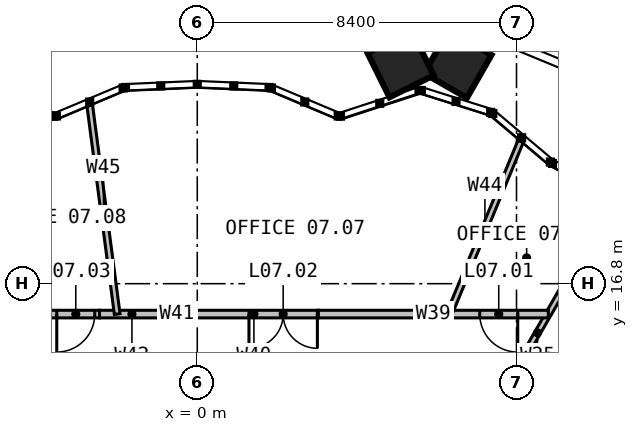
"""IFC4 building model, lengths in metres.
Left out: names, types, materials, properties, quantities, classifications, styles, units other than length and angle.
Written with IfcOpenShell. Run it as: python <this file> out.ifc"""

import sys

from ifc_helpers import new_model, si_unit, direction, frame, frame_2d, origin, place, context, subcontext, project, spatial, rectangle, extrude, element, fill, save


model = new_model("IFC4")
c1 = context("Model", 3, precision=1e-05, world=origin(), true_north=direction((0.0, 1.0)))
c2 = subcontext(c1, "Body", "Model", "MODEL_VIEW")
j1 = project(units=[si_unit("LENGTHUNIT", "METRE"), si_unit("PLANEANGLEUNIT", "RADIAN")], contexts=[c1])
p1 = place(None, origin())
s1 = spatial("IfcSite", under=j1, at=p1, CompositionType="ELEMENT")
p2 = place(p1, origin())
s2 = spatial("IfcBuilding", under=s1, at=p2, CompositionType="ELEMENT")
p3 = place(p2, frame((0.0, 0.0, 33.0)))
s3 = spatial("IfcBuildingStorey", under=s2, at=p3, CompositionType="ELEMENT", Elevation=33.0)
p4 = place(p3, frame((6.928, 12.0, 0.0), z_axis=(0.0, 0.0, 1.0), x_axis=(0.500007814618, 0.866020891966, 0.0)))
e1 = element("IfcWall", 1, at=p4, inside=s3, PredefinedType="PARTITIONING", context=c2, shape_type="SweptSolid", body=[
    extrude(rectangle(XDim=8.097, YDim=0.15, at=frame_2d((4.048, 0.0))), origin(), (0.0, 0.0, 1.0), 2.79),
])
p5 = place(p3, frame((9.238, 16.0, 0.0), z_axis=(0.0, 0.0, 1.0), x_axis=(-1.0, 0.0, 0.0)))
e2 = element("IfcWall", 2, at=p5, inside=s3, PredefinedType="PARTITIONING", context=c2, shape_type="SweptSolid", body=[
    extrude(rectangle(XDim=6.057, YDim=0.2, at=frame_2d((3.029, 0.0))), origin(), (0.0, 0.0, 1.0), 3.8),
])
p6 = place(p5, frame((0.805, 0.0, 0.0)))
e3 = element("IfcOpeningElement", 3, at=p6, cuts=e2, PredefinedType="OPENING", context=c2, shape_type="SweptSolid", body=[
    extrude(rectangle(XDim=1.0, YDim=2.2, at=frame_2d((0.5, 1.1))), frame((0.0, 0.11, 0.0), z_axis=(0.0, -1.0, 0.0), x_axis=(1.0, 0.0, 0.0)), (0.0, 0.0, 1.0), 0.22),
])
p7 = place(p3, frame((3.18, 16.0, 0.0), z_axis=(0.0, 0.0, 1.0), x_axis=(-1.0, 0.0, 0.0)))
e4 = element("IfcWall", 4, at=p7, inside=s3, PredefinedType="PARTITIONING", context=c2, shape_type="SweptSolid", body=[
    extrude(rectangle(XDim=3.379, YDim=0.2, at=frame_2d((1.689, 0.0))), origin(), (0.0, 0.0, 1.0), 3.4),
])
p8 = place(p7, frame((0.02, 0.0, 0.0)))
e5 = element("IfcOpeningElement", 5, at=p8, cuts=e4, PredefinedType="OPENING", context=c2, shape_type="SweptSolid", body=[
    extrude(rectangle(XDim=1.8, YDim=2.2, at=frame_2d((0.9, 1.1))), frame((0.0, 0.11, 0.0), z_axis=(0.0, -1.0, 0.0), x_axis=(1.0, 0.0, 0.0)), (0.0, 0.0, 1.0), 0.22),
])
p9 = place(p3, frame((-0.198, 16.0, 0.0), z_axis=(0.0, 0.0, 1.0), x_axis=(-1.0, 0.0, 0.0)))
e6 = element("IfcWall", 6, at=p9, inside=s3, PredefinedType="PARTITIONING", context=c2, shape_type="SweptSolid", body=[
    extrude(rectangle(XDim=0.667, YDim=0.2, at=frame_2d((0.333, 0.0))), origin(), (0.0, 0.0, 1.0), 3.8),
])
p10 = place(p3, frame((-0.865, 16.0, 0.0), z_axis=(0.0, 0.0, 1.0), x_axis=(-1.0, 0.0, 0.0)))
e7 = element("IfcWall", 7, at=p10, inside=s3, PredefinedType="PARTITIONING", context=c2, shape_type="SweptSolid", body=[
    extrude(rectangle(XDim=1.707, YDim=0.2, at=frame_2d((0.854, 0.0))), origin(), (0.0, 0.0, 1.0), 3.4),
])
p11 = place(p3, frame((-2.572, 16.0, 0.0), z_axis=(0.0, 0.0, 1.0), x_axis=(-1.0, 0.0, 0.0)))
e8 = element("IfcWall", 8, at=p11, inside=s3, PredefinedType="PARTITIONING", context=c2, shape_type="SweptSolid", body=[
    extrude(rectangle(XDim=6.665, YDim=0.2, at=frame_2d((3.333, 0.0))), origin(), (0.0, 0.0, 1.0), 3.8),
])
p12 = place(p11, frame((0.125, 0.0, 0.0)))
e9 = element("IfcOpeningElement", 9, at=p12, cuts=e8, PredefinedType="OPENING", context=c2, shape_type="SweptSolid", body=[
    extrude(rectangle(XDim=1.0, YDim=2.2, at=frame_2d((0.5, 1.1))), frame((0.0, 0.11, 0.0), z_axis=(0.0, -1.0, 0.0), x_axis=(1.0, 0.0, 0.0)), (0.0, 0.0, 1.0), 0.22),
])
p13 = place(p11, frame((3.69, 0.0, 0.0)))
e10 = element("IfcOpeningElement", 10, at=p13, cuts=e8, PredefinedType="OPENING", context=c2, shape_type="SweptSolid", body=[
    extrude(rectangle(XDim=1.0, YDim=2.2, at=frame_2d((0.5, 1.1))), frame((0.0, 0.11, 0.0), z_axis=(0.0, -1.0, 0.0), x_axis=(1.0, 0.0, 0.0)), (0.0, 0.0, 1.0), 0.22),
])
p14 = place(p3, frame((6.627, 16.0, 0.0), z_axis=(0.0, 0.0, 1.0), x_axis=(0.38266590054, 0.923886794236, 0.0)))
e11 = element("IfcWall", 11, at=p14, inside=s3, PredefinedType="PARTITIONING", context=c2, shape_type="SweptSolid", body=[
    extrude(rectangle(XDim=4.92, YDim=0.15, at=frame_2d((2.46, 0.0))), origin(), (0.0, 0.0, 1.0), 2.79),
])
p15 = place(p3, frame((-2.106, 16.0, 0.0), z_axis=(0.0, 0.0, 1.0), x_axis=(-0.130538988536, 0.991443176623, 0.0)))
e12 = element("IfcWall", 12, at=p15, inside=s3, PredefinedType="PARTITIONING", context=c2, shape_type="SweptSolid", body=[
    extrude(rectangle(XDim=5.532, YDim=0.15, at=frame_2d((2.766, 0.0))), origin(), (0.0, 0.0, 1.0), 2.79),
])
p16 = place(p6, origin())
e13 = element("IfcDoor", 13, at=p16, inside=s3, OperationType="SINGLE_SWING_LEFT", PredefinedType="DOOR", context=c2, shape_type="SweptSolid", body=[
    extrude(rectangle(XDim=1.0, YDim=2.2, at=frame_2d((0.5, 1.1))), frame((0.0, 0.025, 0.0), z_axis=(0.0, -1.0, 0.0), x_axis=(1.0, 0.0, 0.0)), (0.0, 0.0, 1.0), 0.05),
])
fill(e3, e13)
p17 = place(p8, origin())
e14 = element("IfcDoor", 14, at=p17, inside=s3, OperationType="DOUBLE_DOOR_SINGLE_SWING", PredefinedType="DOOR", context=c2, shape_type="SweptSolid", body=[
    extrude(rectangle(XDim=1.8, YDim=2.2, at=frame_2d((0.9, 1.1))), frame((0.0, 0.025, 0.0), z_axis=(0.0, -1.0, 0.0), x_axis=(1.0, 0.0, 0.0)), (0.0, 0.0, 1.0), 0.05),
])
fill(e5, e14)
p18 = place(p12, origin())
e15 = element("IfcDoor", 15, at=p18, inside=s3, OperationType="SINGLE_SWING_RIGHT", PredefinedType="DOOR", context=c2, shape_type="SweptSolid", body=[
    extrude(rectangle(XDim=1.0, YDim=2.2, at=frame_2d((0.5, 1.1))), frame((0.0, 0.025, 0.0), z_axis=(0.0, -1.0, 0.0), x_axis=(1.0, 0.0, 0.0)), (0.0, 0.0, 1.0), 0.05),
])
fill(e9, e15)
save(model, sys.argv[1])
